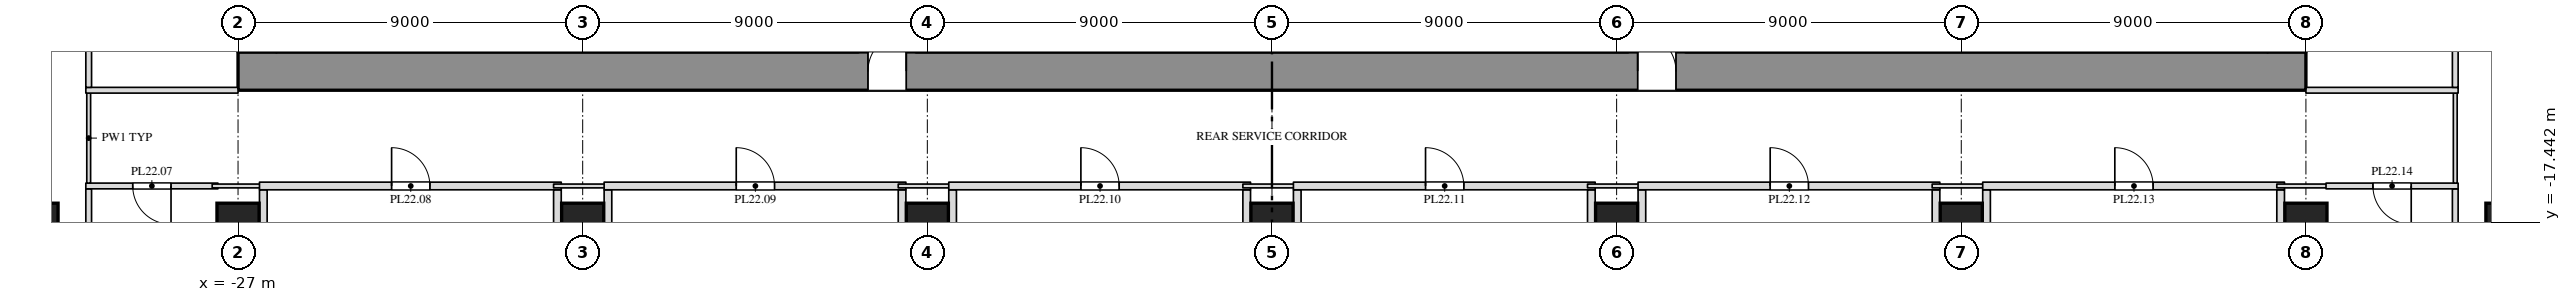
"""IFC4 building model, lengths in metres.
Left out: names, types, materials, properties, quantities, classifications, styles, units other than length and angle.
Written with IfcOpenShell. Run it as: python <this file> out.ifc"""

import sys

from ifc_helpers import new_model, si_unit, direction, frame, frame_2d, origin, origin_2d, place, context, subcontext, project, spatial, rectangle, extrude, element, fill, save


model = new_model("IFC4")
c1 = context("Model", 3, precision=1e-05, world=origin(), true_north=direction((0.0, 1.0)))
c2 = subcontext(c1, "Body", "Model", "MODEL_VIEW")
j1 = project(units=[si_unit("LENGTHUNIT", "METRE"), si_unit("PLANEANGLEUNIT", "RADIAN")], contexts=[c1])
p1 = place(None, origin())
s1 = spatial("IfcSite", under=j1, at=p1, CompositionType="ELEMENT")
p2 = place(p1, origin())
s2 = spatial("IfcBuilding", under=s1, at=p2, CompositionType="ELEMENT")
p3 = place(p2, frame((0.0, 0.0, 104.5)))
s3 = spatial("IfcBuildingStorey", under=s2, at=p3, CompositionType="ELEMENT", Elevation=104.5)
for number, where, z_axis, x_axis in (
    (1, (-32.25, -17.5, 0.0), (0.0, 0.0, 1.0), (1.0, 0.0, 0.0)),
    (2, (-27.0, -17.5, 0.0), (0.0, 0.0, 1.0), (1.0, 0.0, 0.0)),
    (3, (-18.0, -17.5, 0.0), (0.0, 0.0, 1.0), (1.0, 0.0, 0.0)),
    (4, (-9.0, -17.5, 0.0), (0.0, 0.0, 1.0), (1.0, 0.0, 0.0)),
    (5, (0.0, -17.5, 0.0), (0.0, 0.0, 1.0), (1.0, 0.0, 0.0)),
    (6, (9.0, -17.5, 0.0), (0.0, 0.0, 1.0), (1.0, 0.0, 0.0)),
    (7, (18.0, -17.5, 0.0), (0.0, 0.0, 1.0), (1.0, 0.0, 0.0)),
    (8, (27.0, -17.5, 0.0), (0.0, 0.0, 1.0), (1.0, 0.0, 0.0)),
    (9, (32.25, -17.5, 0.0), (0.0, 0.0, 1.0), (1.0, 0.0, 0.0)),
):
    element("IfcColumn", number, at=place(p3, frame(where, z_axis=z_axis, x_axis=x_axis)), inside=s3, PredefinedType="COLUMN", context=c2, shape_type="SweptSolid", body=[
        extrude(rectangle(XDim=1.1, YDim=1.1, at=origin_2d()), origin(), (0.0, 0.0, 1.0), 4.0),
    ])
p4 = place(p3, frame((-27.0, -13.5, 0.0), z_axis=(0.0, 0.0, 1.0), x_axis=(1.0, 0.0, 0.0)))
e10 = element("IfcWall", 10, at=p4, inside=s3, PredefinedType="SHEAR", context=c2, shape_type="SweptSolid", body=[
    extrude(rectangle(XDim=54.0, YDim=1.0, at=frame_2d((27.0, 0.0))), origin(), (0.0, 0.0, 1.0), 3.8),
])
p5 = place(p4, frame((16.45, 0.0, 0.0)))
e11 = element("IfcOpeningElement", 11, at=p5, cuts=e10, PredefinedType="OPENING", context=c2, shape_type="SweptSolid", body=[
    extrude(rectangle(XDim=1.0, YDim=2.1, at=frame_2d((0.5, 1.05))), frame((0.0, 0.512, 0.0), z_axis=(0.0, -1.0, 0.0), x_axis=(1.0, 0.0, 0.0)), (0.0, 0.0, 1.0), 1.024),
])
p6 = place(p4, frame((36.55, 0.0, 0.0)))
e12 = element("IfcOpeningElement", 12, at=p6, cuts=e10, PredefinedType="OPENING", context=c2, shape_type="SweptSolid", body=[
    extrude(rectangle(XDim=1.0, YDim=2.1, at=frame_2d((0.5, 1.05))), frame((0.0, 0.512, 0.0), z_axis=(0.0, -1.0, 0.0), x_axis=(1.0, 0.0, 0.0)), (0.0, 0.0, 1.0), 1.024),
])
p7 = place(p3, frame((-26.34, -24.482, 0.0), z_axis=(0.0, 0.0, 1.0), x_axis=(0.0, 1.0, 0.0)))
e13 = element("IfcWall", 13, at=p7, inside=s3, PredefinedType="PARTITIONING", context=c2, shape_type="SweptSolid", body=[
    extrude(rectangle(XDim=7.882, YDim=0.2, at=frame_2d((3.941, 0.0))), origin(), (0.0, 0.0, 1.0), 3.8),
])
for number, where, z_axis, x_axis in (
    (14, (-18.66, -24.0, 0.0), (0.0, 0.0, 1.0), (0.0, 1.0, 0.0)),
    (15, (-17.34, -24.0, 0.0), (0.0, 0.0, 1.0), (0.0, 1.0, 0.0)),
):
    element("IfcWall", number, at=place(p3, frame(where, z_axis=z_axis, x_axis=x_axis)), inside=s3, PredefinedType="PARTITIONING", context=c2, shape_type="SweptSolid", body=[
        extrude(rectangle(XDim=7.4, YDim=0.2, at=frame_2d((3.7, 0.0))), origin(), (0.0, 0.0, 1.0), 3.8),
    ])
for number, where, z_axis, x_axis in (
    (16, (-9.66, -24.482, 0.0), (0.0, 0.0, 1.0), (0.0, 1.0, 0.0)),
    (17, (-8.34, -24.482, 0.0), (0.0, 0.0, 1.0), (0.0, 1.0, 0.0)),
):
    element("IfcWall", number, at=place(p3, frame(where, z_axis=z_axis, x_axis=x_axis)), inside=s3, PredefinedType="PARTITIONING", context=c2, shape_type="SweptSolid", body=[
        extrude(rectangle(XDim=7.882, YDim=0.2, at=frame_2d((3.941, 0.0))), origin(), (0.0, 0.0, 1.0), 3.8),
    ])
for number, where, z_axis, x_axis in (
    (18, (-0.66, -24.0, 0.0), (0.0, 0.0, 1.0), (0.0, 1.0, 0.0)),
    (19, (0.66, -24.0, 0.0), (0.0, 0.0, 1.0), (0.0, 1.0, 0.0)),
):
    element("IfcWall", number, at=place(p3, frame(where, z_axis=z_axis, x_axis=x_axis)), inside=s3, PredefinedType="PARTITIONING", context=c2, shape_type="SweptSolid", body=[
        extrude(rectangle(XDim=7.4, YDim=0.2, at=frame_2d((3.7, 0.0))), origin(), (0.0, 0.0, 1.0), 3.8),
    ])
for number, where, z_axis, x_axis in (
    (20, (8.34, -24.482, 0.0), (0.0, 0.0, 1.0), (0.0, 1.0, 0.0)),
    (21, (9.66, -24.482, 0.0), (0.0, 0.0, 1.0), (0.0, 1.0, 0.0)),
):
    element("IfcWall", number, at=place(p3, frame(where, z_axis=z_axis, x_axis=x_axis)), inside=s3, PredefinedType="PARTITIONING", context=c2, shape_type="SweptSolid", body=[
        extrude(rectangle(XDim=7.882, YDim=0.2, at=frame_2d((3.941, 0.0))), origin(), (0.0, 0.0, 1.0), 3.8),
    ])
for number, where, z_axis, x_axis in (
    (22, (17.34, -24.0, 0.0), (0.0, 0.0, 1.0), (0.0, 1.0, 0.0)),
    (23, (18.66, -24.0, 0.0), (0.0, 0.0, 1.0), (0.0, 1.0, 0.0)),
):
    element("IfcWall", number, at=place(p3, frame(where, z_axis=z_axis, x_axis=x_axis)), inside=s3, PredefinedType="PARTITIONING", context=c2, shape_type="SweptSolid", body=[
        extrude(rectangle(XDim=7.4, YDim=0.2, at=frame_2d((3.7, 0.0))), origin(), (0.0, 0.0, 1.0), 3.8),
    ])
p8 = place(p3, frame((26.34, -24.482, 0.0), z_axis=(0.0, 0.0, 1.0), x_axis=(0.0, 1.0, 0.0)))
e24 = element("IfcWall", 24, at=p8, inside=s3, PredefinedType="PARTITIONING", context=c2, shape_type="SweptSolid", body=[
    extrude(rectangle(XDim=7.882, YDim=0.2, at=frame_2d((3.941, 0.0))), origin(), (0.0, 0.0, 1.0), 3.8),
])
for number, where, z_axis, x_axis in (
    (25, (-30.9, -22.94, 0.0), (0.0, 0.0, 1.0), (0.0, 1.0, 0.0)),
    (26, (30.9, -22.94, 0.0), (0.0, 0.0, 1.0), (0.0, 1.0, 0.0)),
):
    element("IfcWall", number, at=place(p3, frame(where, z_axis=z_axis, x_axis=x_axis)), inside=s3, PredefinedType="PARTITIONING", context=c2, shape_type="SweptSolid", body=[
        extrude(rectangle(XDim=6.365, YDim=0.15, at=frame_2d((3.183, 0.0))), origin(), (0.0, 0.0, 1.0), 3.8),
    ])
p9 = place(p3, frame((-30.975, -16.5, 0.0), z_axis=(0.0, 0.0, 1.0), x_axis=(1.0, 0.0, 0.0)))
e27 = element("IfcWall", 27, at=p9, inside=s3, PredefinedType="PARTITIONING", context=c2, shape_type="SweptSolid", body=[
    extrude(rectangle(XDim=3.45, YDim=0.15, at=frame_2d((1.725, 0.0))), origin(), (0.0, 0.0, 1.0), 3.8),
])
p10 = place(p9, frame((1.225, 0.0, 0.0)))
e28 = element("IfcOpeningElement", 28, at=p10, cuts=e27, PredefinedType="OPENING", context=c2, shape_type="SweptSolid", body=[
    extrude(rectangle(XDim=1.0, YDim=2.1, at=frame_2d((0.5, 1.05))), frame((0.0, 0.087, 0.0), z_axis=(0.0, -1.0, 0.0), x_axis=(1.0, 0.0, 0.0)), (0.0, 0.0, 1.0), 0.174),
])
p11 = place(p3, frame((-30.9, -16.425, 0.0), z_axis=(0.0, 0.0, 1.0), x_axis=(0.0, 1.0, 0.0)))
e29 = element("IfcWall", 29, at=p11, inside=s3, PredefinedType="PARTITIONING", context=c2, shape_type="SweptSolid", body=[
    extrude(rectangle(XDim=2.35, YDim=0.1, at=frame_2d((1.175, 0.0))), origin(), (0.0, 0.0, 1.0), 3.8),
])
p12 = place(p3, frame((-27.675, -16.5, 0.0), z_axis=(0.0, 0.0, 1.0), x_axis=(1.0, 0.0, 0.0)))
e30 = element("IfcWall", 30, at=p12, inside=s3, PredefinedType="PARTITIONING", context=c2, shape_type="SweptSolid", body=[
    extrude(rectangle(XDim=1.435, YDim=0.1, at=frame_2d((0.718, 0.0))), origin(), (0.0, 0.0, 1.0), 3.8),
])
p13 = place(p3, frame((-26.44, -16.5, 0.0), z_axis=(0.0, 0.0, 1.0), x_axis=(1.0, 0.0, 0.0)))
e31 = element("IfcWall", 31, at=p13, inside=s3, PredefinedType="PARTITIONING", context=c2, shape_type="SweptSolid", body=[
    extrude(rectangle(XDim=7.88, YDim=0.2, at=frame_2d((3.94, 0.0))), origin(), (0.0, 0.0, 1.0), 3.8),
])
p14 = place(p13, frame((3.45, 0.0, 0.0)))
e32 = element("IfcOpeningElement", 32, at=p14, cuts=e31, PredefinedType="OPENING", context=c2, shape_type="SweptSolid", body=[
    extrude(rectangle(XDim=1.0, YDim=2.1, at=frame_2d((0.5, 1.05))), frame((0.0, 0.112, 0.0), z_axis=(0.0, -1.0, 0.0), x_axis=(1.0, 0.0, 0.0)), (0.0, 0.0, 1.0), 0.224),
])
p15 = place(p3, frame((-18.76, -16.5, 0.0), z_axis=(0.0, 0.0, 1.0), x_axis=(1.0, 0.0, 0.0)))
e33 = element("IfcWall", 33, at=p15, inside=s3, PredefinedType="PARTITIONING", context=c2, shape_type="SweptSolid", body=[
    extrude(rectangle(XDim=1.52, YDim=0.1, at=frame_2d((0.76, 0.0))), origin(), (0.0, 0.0, 1.0), 3.8),
])
p16 = place(p3, frame((-17.44, -16.5, 0.0), z_axis=(0.0, 0.0, 1.0), x_axis=(1.0, 0.0, 0.0)))
e34 = element("IfcWall", 34, at=p16, inside=s3, PredefinedType="PARTITIONING", context=c2, shape_type="SweptSolid", body=[
    extrude(rectangle(XDim=7.88, YDim=0.2, at=frame_2d((3.94, 0.0))), origin(), (0.0, 0.0, 1.0), 3.8),
])
p17 = place(p16, frame((3.45, 0.0, 0.0)))
e35 = element("IfcOpeningElement", 35, at=p17, cuts=e34, PredefinedType="OPENING", context=c2, shape_type="SweptSolid", body=[
    extrude(rectangle(XDim=1.0, YDim=2.1, at=frame_2d((0.5, 1.05))), frame((0.0, 0.112, 0.0), z_axis=(0.0, -1.0, 0.0), x_axis=(1.0, 0.0, 0.0)), (0.0, 0.0, 1.0), 0.224),
])
p18 = place(p3, frame((-9.76, -16.5, 0.0), z_axis=(0.0, 0.0, 1.0), x_axis=(1.0, 0.0, 0.0)))
e36 = element("IfcWall", 36, at=p18, inside=s3, PredefinedType="PARTITIONING", context=c2, shape_type="SweptSolid", body=[
    extrude(rectangle(XDim=1.52, YDim=0.1, at=frame_2d((0.76, 0.0))), origin(), (0.0, 0.0, 1.0), 3.8),
])
p19 = place(p3, frame((-8.44, -16.5, 0.0), z_axis=(0.0, 0.0, 1.0), x_axis=(1.0, 0.0, 0.0)))
e37 = element("IfcWall", 37, at=p19, inside=s3, PredefinedType="PARTITIONING", context=c2, shape_type="SweptSolid", body=[
    extrude(rectangle(XDim=7.88, YDim=0.2, at=frame_2d((3.94, 0.0))), origin(), (0.0, 0.0, 1.0), 3.8),
])
p20 = place(p19, frame((3.45, 0.0, 0.0)))
e38 = element("IfcOpeningElement", 38, at=p20, cuts=e37, PredefinedType="OPENING", context=c2, shape_type="SweptSolid", body=[
    extrude(rectangle(XDim=1.0, YDim=2.1, at=frame_2d((0.5, 1.05))), frame((0.0, 0.112, 0.0), z_axis=(0.0, -1.0, 0.0), x_axis=(1.0, 0.0, 0.0)), (0.0, 0.0, 1.0), 0.224),
])
p21 = place(p3, frame((-0.76, -16.5, 0.0), z_axis=(0.0, 0.0, 1.0), x_axis=(1.0, 0.0, 0.0)))
e39 = element("IfcWall", 39, at=p21, inside=s3, PredefinedType="PARTITIONING", context=c2, shape_type="SweptSolid", body=[
    extrude(rectangle(XDim=1.52, YDim=0.1, at=frame_2d((0.76, 0.0))), origin(), (0.0, 0.0, 1.0), 3.8),
])
p22 = place(p3, frame((0.56, -16.5, 0.0), z_axis=(0.0, 0.0, 1.0), x_axis=(1.0, 0.0, 0.0)))
e40 = element("IfcWall", 40, at=p22, inside=s3, PredefinedType="PARTITIONING", context=c2, shape_type="SweptSolid", body=[
    extrude(rectangle(XDim=7.88, YDim=0.2, at=frame_2d((3.94, 0.0))), origin(), (0.0, 0.0, 1.0), 3.8),
])
p23 = place(p22, frame((3.45, 0.0, 0.0)))
e41 = element("IfcOpeningElement", 41, at=p23, cuts=e40, PredefinedType="OPENING", context=c2, shape_type="SweptSolid", body=[
    extrude(rectangle(XDim=1.0, YDim=2.1, at=frame_2d((0.5, 1.05))), frame((0.0, 0.112, 0.0), z_axis=(0.0, -1.0, 0.0), x_axis=(1.0, 0.0, 0.0)), (0.0, 0.0, 1.0), 0.224),
])
p24 = place(p3, frame((8.24, -16.5, 0.0), z_axis=(0.0, 0.0, 1.0), x_axis=(1.0, 0.0, 0.0)))
e42 = element("IfcWall", 42, at=p24, inside=s3, PredefinedType="PARTITIONING", context=c2, shape_type="SweptSolid", body=[
    extrude(rectangle(XDim=1.52, YDim=0.1, at=frame_2d((0.76, 0.0))), origin(), (0.0, 0.0, 1.0), 3.8),
])
p25 = place(p3, frame((9.56, -16.5, 0.0), z_axis=(0.0, 0.0, 1.0), x_axis=(1.0, 0.0, 0.0)))
e43 = element("IfcWall", 43, at=p25, inside=s3, PredefinedType="PARTITIONING", context=c2, shape_type="SweptSolid", body=[
    extrude(rectangle(XDim=7.88, YDim=0.2, at=frame_2d((3.94, 0.0))), origin(), (0.0, 0.0, 1.0), 3.8),
])
p26 = place(p25, frame((3.45, 0.0, 0.0)))
e44 = element("IfcOpeningElement", 44, at=p26, cuts=e43, PredefinedType="OPENING", context=c2, shape_type="SweptSolid", body=[
    extrude(rectangle(XDim=1.0, YDim=2.1, at=frame_2d((0.5, 1.05))), frame((0.0, 0.112, 0.0), z_axis=(0.0, -1.0, 0.0), x_axis=(1.0, 0.0, 0.0)), (0.0, 0.0, 1.0), 0.224),
])
p27 = place(p3, frame((17.24, -16.5, 0.0), z_axis=(0.0, 0.0, 1.0), x_axis=(1.0, 0.0, 0.0)))
e45 = element("IfcWall", 45, at=p27, inside=s3, PredefinedType="PARTITIONING", context=c2, shape_type="SweptSolid", body=[
    extrude(rectangle(XDim=1.52, YDim=0.1, at=frame_2d((0.76, 0.0))), origin(), (0.0, 0.0, 1.0), 3.8),
])
p28 = place(p3, frame((18.56, -16.5, 0.0), z_axis=(0.0, 0.0, 1.0), x_axis=(1.0, 0.0, 0.0)))
e46 = element("IfcWall", 46, at=p28, inside=s3, PredefinedType="PARTITIONING", context=c2, shape_type="SweptSolid", body=[
    extrude(rectangle(XDim=7.88, YDim=0.2, at=frame_2d((3.94, 0.0))), origin(), (0.0, 0.0, 1.0), 3.8),
])
p29 = place(p28, frame((3.45, 0.0, 0.0)))
e47 = element("IfcOpeningElement", 47, at=p29, cuts=e46, PredefinedType="OPENING", context=c2, shape_type="SweptSolid", body=[
    extrude(rectangle(XDim=1.0, YDim=2.1, at=frame_2d((0.5, 1.05))), frame((0.0, 0.112, 0.0), z_axis=(0.0, -1.0, 0.0), x_axis=(1.0, 0.0, 0.0)), (0.0, 0.0, 1.0), 0.224),
])
p30 = place(p3, frame((26.24, -16.5, 0.0), z_axis=(0.0, 0.0, 1.0), x_axis=(1.0, 0.0, 0.0)))
e48 = element("IfcWall", 48, at=p30, inside=s3, PredefinedType="PARTITIONING", context=c2, shape_type="SweptSolid", body=[
    extrude(rectangle(XDim=1.435, YDim=0.1, at=frame_2d((0.718, 0.0))), origin(), (0.0, 0.0, 1.0), 3.8),
])
p31 = place(p3, frame((27.525, -16.5, 0.0), z_axis=(0.0, 0.0, 1.0), x_axis=(1.0, 0.0, 0.0)))
e49 = element("IfcWall", 49, at=p31, inside=s3, PredefinedType="PARTITIONING", context=c2, shape_type="SweptSolid", body=[
    extrude(rectangle(XDim=3.45, YDim=0.15, at=frame_2d((1.725, 0.0))), origin(), (0.0, 0.0, 1.0), 3.8),
])
p32 = place(p31, frame((1.225, 0.0, 0.0)))
e50 = element("IfcOpeningElement", 50, at=p32, cuts=e49, PredefinedType="OPENING", context=c2, shape_type="SweptSolid", body=[
    extrude(rectangle(XDim=1.0, YDim=2.1, at=frame_2d((0.5, 1.05))), frame((0.0, 0.087, 0.0), z_axis=(0.0, -1.0, 0.0), x_axis=(1.0, 0.0, 0.0)), (0.0, 0.0, 1.0), 0.174),
])
p33 = place(p3, frame((30.9, -16.425, 0.0), z_axis=(0.0, 0.0, 1.0), x_axis=(0.0, 1.0, 0.0)))
e51 = element("IfcWall", 51, at=p33, inside=s3, PredefinedType="PARTITIONING", context=c2, shape_type="SweptSolid", body=[
    extrude(rectangle(XDim=2.35, YDim=0.1, at=frame_2d((1.175, 0.0))), origin(), (0.0, 0.0, 1.0), 3.8),
])
p34 = place(p3, frame((-30.975, -14.0, 0.0), z_axis=(0.0, 0.0, 1.0), x_axis=(1.0, 0.0, 0.0)))
e52 = element("IfcWall", 52, at=p34, inside=s3, PredefinedType="PARTITIONING", context=c2, shape_type="SweptSolid", body=[
    extrude(rectangle(XDim=3.975, YDim=0.15, at=frame_2d((1.988, 0.0))), origin(), (0.0, 0.0, 1.0), 3.8),
])
p35 = place(p3, frame((-30.9, -13.925, 0.0), z_axis=(0.0, 0.0, 1.0), x_axis=(0.0, 1.0, 0.0)))
e53 = element("IfcWall", 53, at=p35, inside=s3, PredefinedType="PARTITIONING", context=c2, shape_type="SweptSolid", body=[
    extrude(rectangle(XDim=11.85, YDim=0.15, at=frame_2d((5.925, 0.0))), origin(), (0.0, 0.0, 1.0), 3.8),
])
p36 = place(p3, frame((27.0, -14.0, 0.0), z_axis=(0.0, 0.0, 1.0), x_axis=(1.0, 0.0, 0.0)))
e54 = element("IfcWall", 54, at=p36, inside=s3, PredefinedType="PARTITIONING", context=c2, shape_type="SweptSolid", body=[
    extrude(rectangle(XDim=3.975, YDim=0.15, at=frame_2d((1.988, 0.0))), origin(), (0.0, 0.0, 1.0), 3.8),
])
p37 = place(p3, frame((30.9, -13.925, 0.0), z_axis=(0.0, 0.0, 1.0), x_axis=(0.0, 1.0, 0.0)))
e55 = element("IfcWall", 55, at=p37, inside=s3, PredefinedType="PARTITIONING", context=c2, shape_type="SweptSolid", body=[
    extrude(rectangle(XDim=11.85, YDim=0.15, at=frame_2d((5.925, 0.0))), origin(), (0.0, 0.0, 1.0), 3.8),
])
p38 = place(p10, origin())
e56 = element("IfcDoor", 56, at=p38, inside=s3, OperationType="SINGLE_SWING_LEFT", PredefinedType="DOOR", context=c2, shape_type="SweptSolid", body=[
    extrude(rectangle(XDim=1.0, YDim=2.1, at=frame_2d((0.5, 1.05))), frame((0.0, 0.025, 0.0), z_axis=(0.0, -1.0, 0.0), x_axis=(1.0, 0.0, 0.0)), (0.0, 0.0, 1.0), 0.05),
])
fill(e28, e56)
p39 = place(p14, origin())
e57 = element("IfcDoor", 57, at=p39, inside=s3, OperationType="SINGLE_SWING_LEFT", PredefinedType="DOOR", context=c2, shape_type="SweptSolid", body=[
    extrude(rectangle(XDim=1.0, YDim=2.1, at=frame_2d((0.5, 1.05))), frame((0.0, 0.025, 0.0), z_axis=(0.0, -1.0, 0.0), x_axis=(1.0, 0.0, 0.0)), (0.0, 0.0, 1.0), 0.05),
])
fill(e32, e57)
p40 = place(p17, origin())
e58 = element("IfcDoor", 58, at=p40, inside=s3, OperationType="SINGLE_SWING_LEFT", PredefinedType="DOOR", context=c2, shape_type="SweptSolid", body=[
    extrude(rectangle(XDim=1.0, YDim=2.1, at=frame_2d((0.5, 1.05))), frame((0.0, 0.025, 0.0), z_axis=(0.0, -1.0, 0.0), x_axis=(1.0, 0.0, 0.0)), (0.0, 0.0, 1.0), 0.05),
])
fill(e35, e58)
p41 = place(p20, origin())
e59 = element("IfcDoor", 59, at=p41, inside=s3, OperationType="SINGLE_SWING_LEFT", PredefinedType="DOOR", context=c2, shape_type="SweptSolid", body=[
    extrude(rectangle(XDim=1.0, YDim=2.1, at=frame_2d((0.5, 1.05))), frame((0.0, 0.025, 0.0), z_axis=(0.0, -1.0, 0.0), x_axis=(1.0, 0.0, 0.0)), (0.0, 0.0, 1.0), 0.05),
])
fill(e38, e59)
p42 = place(p23, origin())
e60 = element("IfcDoor", 60, at=p42, inside=s3, OperationType="SINGLE_SWING_LEFT", PredefinedType="DOOR", context=c2, shape_type="SweptSolid", body=[
    extrude(rectangle(XDim=1.0, YDim=2.1, at=frame_2d((0.5, 1.05))), frame((0.0, 0.025, 0.0), z_axis=(0.0, -1.0, 0.0), x_axis=(1.0, 0.0, 0.0)), (0.0, 0.0, 1.0), 0.05),
])
fill(e41, e60)
p43 = place(p26, origin())
e61 = element("IfcDoor", 61, at=p43, inside=s3, OperationType="SINGLE_SWING_LEFT", PredefinedType="DOOR", context=c2, shape_type="SweptSolid", body=[
    extrude(rectangle(XDim=1.0, YDim=2.1, at=frame_2d((0.5, 1.05))), frame((0.0, 0.025, 0.0), z_axis=(0.0, -1.0, 0.0), x_axis=(1.0, 0.0, 0.0)), (0.0, 0.0, 1.0), 0.05),
])
fill(e44, e61)
p44 = place(p29, origin())
e62 = element("IfcDoor", 62, at=p44, inside=s3, OperationType="SINGLE_SWING_LEFT", PredefinedType="DOOR", context=c2, shape_type="SweptSolid", body=[
    extrude(rectangle(XDim=1.0, YDim=2.1, at=frame_2d((0.5, 1.05))), frame((0.0, 0.025, 0.0), z_axis=(0.0, -1.0, 0.0), x_axis=(1.0, 0.0, 0.0)), (0.0, 0.0, 1.0), 0.05),
])
fill(e47, e62)
p45 = place(p32, origin())
e63 = element("IfcDoor", 63, at=p45, inside=s3, OperationType="SINGLE_SWING_LEFT", PredefinedType="DOOR", context=c2, shape_type="SweptSolid", body=[
    extrude(rectangle(XDim=1.0, YDim=2.1, at=frame_2d((0.5, 1.05))), frame((0.0, 0.025, 0.0), z_axis=(0.0, -1.0, 0.0), x_axis=(1.0, 0.0, 0.0)), (0.0, 0.0, 1.0), 0.05),
])
fill(e50, e63)
p46 = place(p5, origin())
e64 = element("IfcDoor", 64, at=p46, inside=s3, OperationType="SINGLE_SWING_RIGHT", PredefinedType="DOOR", context=c2, shape_type="SweptSolid", body=[
    extrude(rectangle(XDim=1.0, YDim=2.1, at=frame_2d((0.5, 1.05))), frame((0.0, 0.025, 0.0), z_axis=(0.0, -1.0, 0.0), x_axis=(1.0, 0.0, 0.0)), (0.0, 0.0, 1.0), 0.05),
])
fill(e11, e64)
p47 = place(p6, origin())
e65 = element("IfcDoor", 65, at=p47, inside=s3, OperationType="SINGLE_SWING_LEFT", PredefinedType="DOOR", context=c2, shape_type="SweptSolid", body=[
    extrude(rectangle(XDim=1.0, YDim=2.1, at=frame_2d((0.5, 1.05))), frame((0.0, 0.025, 0.0), z_axis=(0.0, -1.0, 0.0), x_axis=(1.0, 0.0, 0.0)), (0.0, 0.0, 1.0), 0.05),
])
fill(e12, e65)
save(model, sys.argv[1])
